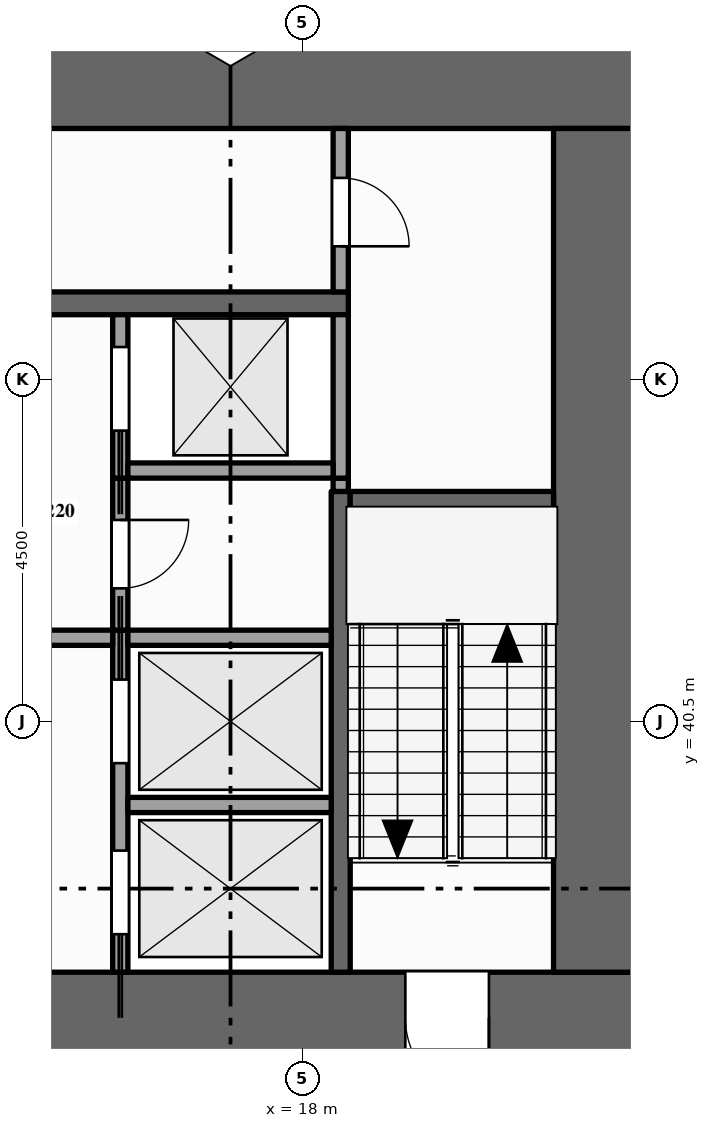
"""IFC4 building model, lengths in metres.
Left out: names, types, materials, properties, quantities, classifications, styles, units other than length and angle.
Written with IfcOpenShell. Run it as: python <this file> out.ifc"""

import sys

from ifc_helpers import new_model, si_unit, direction, frame, frame_2d, origin, place, context, subcontext, project, spatial, rectangle, extrude, element, fill, save


model = new_model("IFC4")
c1 = context("Model", 3, precision=1e-05, world=origin(), true_north=direction((0.0, 1.0)))
c2 = subcontext(c1, "Body", "Model", "MODEL_VIEW")
j1 = project(units=[si_unit("LENGTHUNIT", "METRE"), si_unit("PLANEANGLEUNIT", "RADIAN")], contexts=[c1])
p1 = place(None, origin())
s1 = spatial("IfcSite", under=j1, at=p1, CompositionType="ELEMENT")
p2 = place(p1, origin())
s2 = spatial("IfcBuilding", under=s1, at=p2, CompositionType="ELEMENT")
p3 = place(p2, frame((0.0, 0.0, 115.0)))
s3 = spatial("IfcBuildingStorey", under=s2, at=p3, CompositionType="ELEMENT", Elevation=115.0)
p4 = place(p3, frame((0.0, 36.6, -0.15), z_axis=(0.0, 0.0, 1.0), x_axis=(1.0, 0.0, 0.0)))
e1 = element("IfcWall", 1, at=p4, inside=s3, PredefinedType="SHEAR", context=c2, shape_type="SweptSolid", body=[
    extrude(rectangle(XDim=22.5, YDim=1.2, at=frame_2d((11.25, 0.0))), origin(), (0.0, 0.0, 1.0), 4.0),
])
p5 = place(p4, frame((7.1, 0.0, 0.15)))
e2 = element("IfcOpeningElement", 2, at=p5, cuts=e1, PredefinedType="OPENING", context=c2, shape_type="SweptSolid", body=[
    extrude(rectangle(XDim=1.8, YDim=2.1, at=frame_2d((0.9, 1.05))), frame((0.0, 0.61, 0.0), z_axis=(0.0, -1.0, 0.0), x_axis=(1.0, 0.0, 0.0)), (0.0, 0.0, 1.0), 1.22),
])
p6 = place(p4, frame((13.15, 0.0, 0.15)))
e3 = element("IfcOpeningElement", 3, at=p6, cuts=e1, PredefinedType="OPENING", context=c2, shape_type="SweptSolid", body=[
    extrude(rectangle(XDim=1.1, YDim=2.1, at=frame_2d((0.55, 1.05))), frame((0.0, 0.61, 0.0), z_axis=(0.0, -1.0, 0.0), x_axis=(1.0, 0.0, 0.0)), (0.0, 0.0, 1.0), 1.22),
])
p7 = place(p4, frame((2.15, 0.0, 0.15)))
e4 = element("IfcOpeningElement", 4, at=p7, cuts=e1, PredefinedType="OPENING", context=c2, shape_type="SweptSolid", body=[
    extrude(rectangle(XDim=1.1, YDim=2.1, at=frame_2d((0.55, 1.05))), frame((0.0, 0.61, 0.0), z_axis=(0.0, -1.0, 0.0), x_axis=(1.0, 0.0, 0.0)), (0.0, 0.0, 1.0), 1.22),
])
p8 = place(p4, frame((19.35, 0.0, 0.15)))
e5 = element("IfcOpeningElement", 5, at=p8, cuts=e1, PredefinedType="OPENING", context=c2, shape_type="SweptSolid", body=[
    extrude(rectangle(XDim=1.1, YDim=2.1, at=frame_2d((0.55, 1.05))), frame((0.0, 0.61, 0.0), z_axis=(0.0, -1.0, 0.0), x_axis=(1.0, 0.0, 0.0)), (0.0, 0.0, 1.0), 1.22),
])
p9 = place(p3, frame((0.0, 48.9, -0.15), z_axis=(0.0, 0.0, 1.0), x_axis=(1.0, 0.0, 0.0)))
e6 = element("IfcWall", 6, at=p9, inside=s3, PredefinedType="SHEAR", context=c2, shape_type="SweptSolid", body=[
    extrude(rectangle(XDim=22.5, YDim=1.2, at=frame_2d((11.25, 0.0))), origin(), (0.0, 0.0, 1.0), 4.0),
])
p10 = place(p3, frame((21.9, 37.2, -0.15), z_axis=(0.0, 0.0, 1.0), x_axis=(0.0, 1.0, 0.0)))
e7 = element("IfcWall", 7, at=p10, inside=s3, PredefinedType="SHEAR", context=c2, shape_type="SweptSolid", body=[
    extrude(rectangle(XDim=11.1, YDim=1.2, at=frame_2d((5.55, 0.0))), origin(), (0.0, 0.0, 1.0), 4.0),
])
p11 = place(p3, frame((15.6, 37.2, 0.0), z_axis=(0.0, 0.0, 1.0), x_axis=(0.0, 1.0, 0.0)))
e8 = element("IfcWall", 8, at=p11, inside=s3, PredefinedType="SOLIDWALL", context=c2, shape_type="SweptSolid", body=[
    extrude(rectangle(XDim=4.5, YDim=0.2, at=frame_2d((2.25, 0.0))), origin(), (0.0, 0.0, 1.0), 3.85),
])
p12 = place(p11, frame((0.5, 0.0, 0.012)))
e9 = element("IfcOpeningElement", 9, at=p12, cuts=e8, PredefinedType="OPENING", context=c2, shape_type="SweptSolid", body=[
    extrude(rectangle(XDim=1.1, YDim=2.1, at=frame_2d((0.55, 1.05))), frame((0.0, 0.11, 0.0), z_axis=(0.0, -1.0, 0.0), x_axis=(1.0, 0.0, 0.0)), (0.0, 0.0, 1.0), 0.22),
])
p13 = place(p11, frame((2.75, 0.0, 0.012)))
e10 = element("IfcOpeningElement", 10, at=p13, cuts=e8, PredefinedType="OPENING", context=c2, shape_type="SweptSolid", body=[
    extrude(rectangle(XDim=1.1, YDim=2.1, at=frame_2d((0.55, 1.05))), frame((0.0, 0.11, 0.0), z_axis=(0.0, -1.0, 0.0), x_axis=(1.0, 0.0, 0.0)), (0.0, 0.0, 1.0), 0.22),
])
p14 = place(p3, frame((15.6, 41.7, 0.0), z_axis=(0.0, 0.0, 1.0), x_axis=(0.0, 1.0, 0.0)))
e11 = element("IfcWall", 11, at=p14, inside=s3, PredefinedType="PARTITIONING", context=c2, shape_type="SweptSolid", body=[
    extrude(rectangle(XDim=2.0, YDim=0.2, at=frame_2d((1.0, 0.0))), origin(), (0.0, 0.0, 1.0), 3.85),
])
p15 = place(p14, frame((0.55, 0.0, 0.0)))
e12 = element("IfcOpeningElement", 12, at=p15, cuts=e11, PredefinedType="OPENING", context=c2, shape_type="SweptSolid", body=[
    extrude(rectangle(XDim=0.9, YDim=2.1, at=frame_2d((0.45, 1.05))), frame((0.0, 0.11, 0.0), z_axis=(0.0, -1.0, 0.0), x_axis=(1.0, 0.0, 0.0)), (0.0, 0.0, 1.0), 0.22),
])
p16 = place(p3, frame((15.6, 43.7, 0.0), z_axis=(0.0, 0.0, 1.0), x_axis=(0.0, 1.0, 0.0)))
e13 = element("IfcWall", 13, at=p16, inside=s3, PredefinedType="SOLIDWALL", context=c2, shape_type="SweptSolid", body=[
    extrude(rectangle(XDim=2.15, YDim=0.2, at=frame_2d((1.075, 0.0))), origin(), (0.0, 0.0, 1.0), 3.85),
])
p17 = place(p16, frame((0.625, 0.0, 0.012)))
e14 = element("IfcOpeningElement", 14, at=p17, cuts=e13, PredefinedType="OPENING", context=c2, shape_type="SweptSolid", body=[
    extrude(rectangle(XDim=1.1, YDim=2.1, at=frame_2d((0.55, 1.05))), frame((0.0, 0.11, 0.0), z_axis=(0.0, -1.0, 0.0), x_axis=(1.0, 0.0, 0.0)), (0.0, 0.0, 1.0), 0.22),
])
p18 = place(p3, frame((18.5, 37.2, 0.0), z_axis=(0.0, 0.0, 1.0), x_axis=(0.0, 1.0, 0.0)))
e15 = element("IfcWall", 15, at=p18, inside=s3, PredefinedType="SHEAR", context=c2, shape_type="SweptSolid", body=[
    extrude(rectangle(XDim=6.325, YDim=0.25, at=frame_2d((3.163, 0.0))), origin(), (0.0, 0.0, 1.0), 3.85),
])
p19 = place(p3, frame((18.5, 43.525, 0.0), z_axis=(0.0, 0.0, 1.0), x_axis=(0.0, 1.0, 0.0)))
e16 = element("IfcWall", 16, at=p19, inside=s3, PredefinedType="PARTITIONING", context=c2, shape_type="SweptSolid", body=[
    extrude(rectangle(XDim=0.175, YDim=0.2, at=frame_2d((0.087, 0.0))), origin(), (0.0, 0.0, 1.0), 3.85),
])
p20 = place(p3, frame((18.5, 43.7, 0.0), z_axis=(0.0, 0.0, 1.0), x_axis=(0.0, 1.0, 0.0)))
e17 = element("IfcWall", 17, at=p20, inside=s3, PredefinedType="SOLIDWALL", context=c2, shape_type="SweptSolid", body=[
    extrude(rectangle(XDim=2.15, YDim=0.2, at=frame_2d((1.075, 0.0))), origin(), (0.0, 0.0, 1.0), 3.85),
])
p21 = place(p3, frame((18.5, 46.15, 0.0), z_axis=(0.0, 0.0, 1.0), x_axis=(0.0, 1.0, 0.0)))
e18 = element("IfcWall", 18, at=p21, inside=s3, PredefinedType="PARTITIONING", context=c2, shape_type="SweptSolid", body=[
    extrude(rectangle(XDim=2.15, YDim=0.2, at=frame_2d((1.075, 0.0))), origin(), (0.0, 0.0, 1.0), 3.85),
])
p22 = place(p21, frame((0.6, 0.0, 0.0)))
e19 = element("IfcOpeningElement", 19, at=p22, cuts=e18, PredefinedType="OPENING", context=c2, shape_type="SweptSolid", body=[
    extrude(rectangle(XDim=0.9, YDim=2.1, at=frame_2d((0.45, 1.05))), frame((0.0, 0.11, 0.0), z_axis=(0.0, -1.0, 0.0), x_axis=(1.0, 0.0, 0.0)), (0.0, 0.0, 1.0), 0.22),
])
p23 = place(p3, frame((15.7, 39.4, 0.0), z_axis=(0.0, 0.0, 1.0), x_axis=(1.0, 0.0, 0.0)))
e20 = element("IfcWall", 20, at=p23, inside=s3, PredefinedType="SOLIDWALL", context=c2, shape_type="SweptSolid", body=[
    extrude(rectangle(XDim=2.675, YDim=0.2, at=frame_2d((1.337, 0.0))), origin(), (0.0, 0.0, 1.0), 3.85),
])
p24 = place(p3, frame((11.9, 41.6, 0.0), z_axis=(0.0, 0.0, 1.0), x_axis=(1.0, 0.0, 0.0)))
e21 = element("IfcWall", 21, at=p24, inside=s3, PredefinedType="PARTITIONING", context=c2, shape_type="SweptSolid", body=[
    extrude(rectangle(XDim=3.6, YDim=0.2, at=frame_2d((1.8, 0.0))), origin(), (0.0, 0.0, 1.0), 3.85),
])
p25 = place(p24, frame((1.3, 0.0, 0.0)))
e22 = element("IfcOpeningElement", 22, at=p25, cuts=e21, PredefinedType="OPENING", context=c2, shape_type="SweptSolid", body=[
    extrude(rectangle(XDim=1.0, YDim=2.1, at=frame_2d((0.5, 1.05))), frame((0.0, 0.11, 0.0), z_axis=(0.0, -1.0, 0.0), x_axis=(1.0, 0.0, 0.0)), (0.0, 0.0, 1.0), 0.22),
])
p26 = place(p3, frame((15.7, 41.6, 0.0), z_axis=(0.0, 0.0, 1.0), x_axis=(1.0, 0.0, 0.0)))
e23 = element("IfcWall", 23, at=p26, inside=s3, PredefinedType="SOLIDWALL", context=c2, shape_type="SweptSolid", body=[
    extrude(rectangle(XDim=2.675, YDim=0.2, at=frame_2d((1.337, 0.0))), origin(), (0.0, 0.0, 1.0), 3.85),
])
p27 = place(p3, frame((18.625, 43.4, 0.0), z_axis=(0.0, 0.0, 1.0), x_axis=(1.0, 0.0, 0.0)))
e24 = element("IfcWall", 24, at=p27, inside=s3, PredefinedType="SHEAR", context=c2, shape_type="SweptSolid", body=[
    extrude(rectangle(XDim=2.675, YDim=0.25, at=frame_2d((1.337, 0.0))), origin(), (0.0, 0.0, 1.0), 3.85),
])
p28 = place(p3, frame((15.7, 43.8, 0.0), z_axis=(0.0, 0.0, 1.0), x_axis=(1.0, 0.0, 0.0)))
e25 = element("IfcWall", 25, at=p28, inside=s3, PredefinedType="SOLIDWALL", context=c2, shape_type="SweptSolid", body=[
    extrude(rectangle(XDim=2.7, YDim=0.2, at=frame_2d((1.35, 0.0))), origin(), (0.0, 0.0, 1.0), 3.85),
])
p29 = place(p3, frame((4.1, 46.0, 0.0), z_axis=(0.0, 0.0, 1.0), x_axis=(1.0, 0.0, 0.0)))
e26 = element("IfcWall", 26, at=p29, inside=s3, PredefinedType="SHEAR", context=c2, shape_type="SweptSolid", body=[
    extrude(rectangle(XDim=14.5, YDim=0.3, at=frame_2d((7.25, 0.0))), origin(), (0.0, 0.0, 1.0), 3.85),
])
p30 = place(p29, frame((3.4, 0.0, 0.0)))
e27 = element("IfcOpeningElement", 27, at=p30, cuts=e26, PredefinedType="OPENING", context=c2, shape_type="SweptSolid", body=[
    extrude(rectangle(XDim=1.0, YDim=2.1, at=frame_2d((0.5, 1.05))), frame((0.0, 0.16, 0.0), z_axis=(0.0, -1.0, 0.0), x_axis=(1.0, 0.0, 0.0)), (0.0, 0.0, 1.0), 0.32),
])
p31 = place(p29, frame((9.1, 0.0, 0.0)))
e28 = element("IfcOpeningElement", 28, at=p31, cuts=e26, PredefinedType="OPENING", context=c2, shape_type="SweptSolid", body=[
    extrude(rectangle(XDim=1.0, YDim=2.1, at=frame_2d((0.5, 1.05))), frame((0.0, 0.16, 0.0), z_axis=(0.0, -1.0, 0.0), x_axis=(1.0, 0.0, 0.0)), (0.0, 0.0, 1.0), 0.32),
])
p32 = place(p12, origin())
e29 = element("IfcDoor", 29, at=p32, inside=s3, OperationType="SLIDING_TO_LEFT", PredefinedType="DOOR", context=c2, shape_type="SweptSolid", body=[
    extrude(rectangle(XDim=1.1, YDim=2.1, at=frame_2d((0.55, 1.05))), frame((0.0, 0.025, 0.0), z_axis=(0.0, -1.0, 0.0), x_axis=(1.0, 0.0, 0.0)), (0.0, 0.0, 1.0), 0.05),
])
fill(e9, e29)
p33 = place(p13, origin())
e30 = element("IfcDoor", 30, at=p33, inside=s3, OperationType="SLIDING_TO_RIGHT", PredefinedType="DOOR", context=c2, shape_type="SweptSolid", body=[
    extrude(rectangle(XDim=1.1, YDim=2.1, at=frame_2d((0.55, 1.05))), frame((0.0, 0.025, 0.0), z_axis=(0.0, -1.0, 0.0), x_axis=(1.0, 0.0, 0.0)), (0.0, 0.0, 1.0), 0.05),
])
fill(e10, e30)
p34 = place(p17, origin())
e31 = element("IfcDoor", 31, at=p34, inside=s3, OperationType="SLIDING_TO_LEFT", PredefinedType="DOOR", context=c2, shape_type="SweptSolid", body=[
    extrude(rectangle(XDim=1.1, YDim=2.1, at=frame_2d((0.55, 1.05))), frame((0.0, 0.025, 0.0), z_axis=(0.0, -1.0, 0.0), x_axis=(1.0, 0.0, 0.0)), (0.0, 0.0, 1.0), 0.05),
])
fill(e14, e31)
p35 = place(p8, origin())
e32 = element("IfcDoor", 32, at=p35, inside=s3, OperationType="SINGLE_SWING_RIGHT", PredefinedType="DOOR", context=c2, shape_type="SweptSolid", body=[
    extrude(rectangle(XDim=1.1, YDim=2.1, at=frame_2d((0.55, 1.05))), frame((0.0, 0.025, 0.0), z_axis=(0.0, -1.0, 0.0), x_axis=(1.0, 0.0, 0.0)), (0.0, 0.0, 1.0), 0.05),
])
fill(e5, e32)
p36 = place(p22, origin())
e33 = element("IfcDoor", 33, at=p36, inside=s3, OperationType="SINGLE_SWING_LEFT", PredefinedType="DOOR", context=c2, shape_type="SweptSolid", body=[
    extrude(rectangle(XDim=0.9, YDim=2.1, at=frame_2d((0.45, 1.05))), frame((0.0, 0.025, 0.0), z_axis=(0.0, -1.0, 0.0), x_axis=(1.0, 0.0, 0.0)), (0.0, 0.0, 1.0), 0.05),
])
fill(e19, e33)
p37 = place(p15, origin())
e34 = element("IfcDoor", 34, at=p37, inside=s3, OperationType="SINGLE_SWING_RIGHT", PredefinedType="DOOR", context=c2, shape_type="SweptSolid", body=[
    extrude(rectangle(XDim=0.9, YDim=2.1, at=frame_2d((0.45, 1.05))), frame((0.0, 0.025, 0.0), z_axis=(0.0, -1.0, 0.0), x_axis=(1.0, 0.0, 0.0)), (0.0, 0.0, 1.0), 0.05),
])
fill(e12, e34)
save(model, sys.argv[1])
